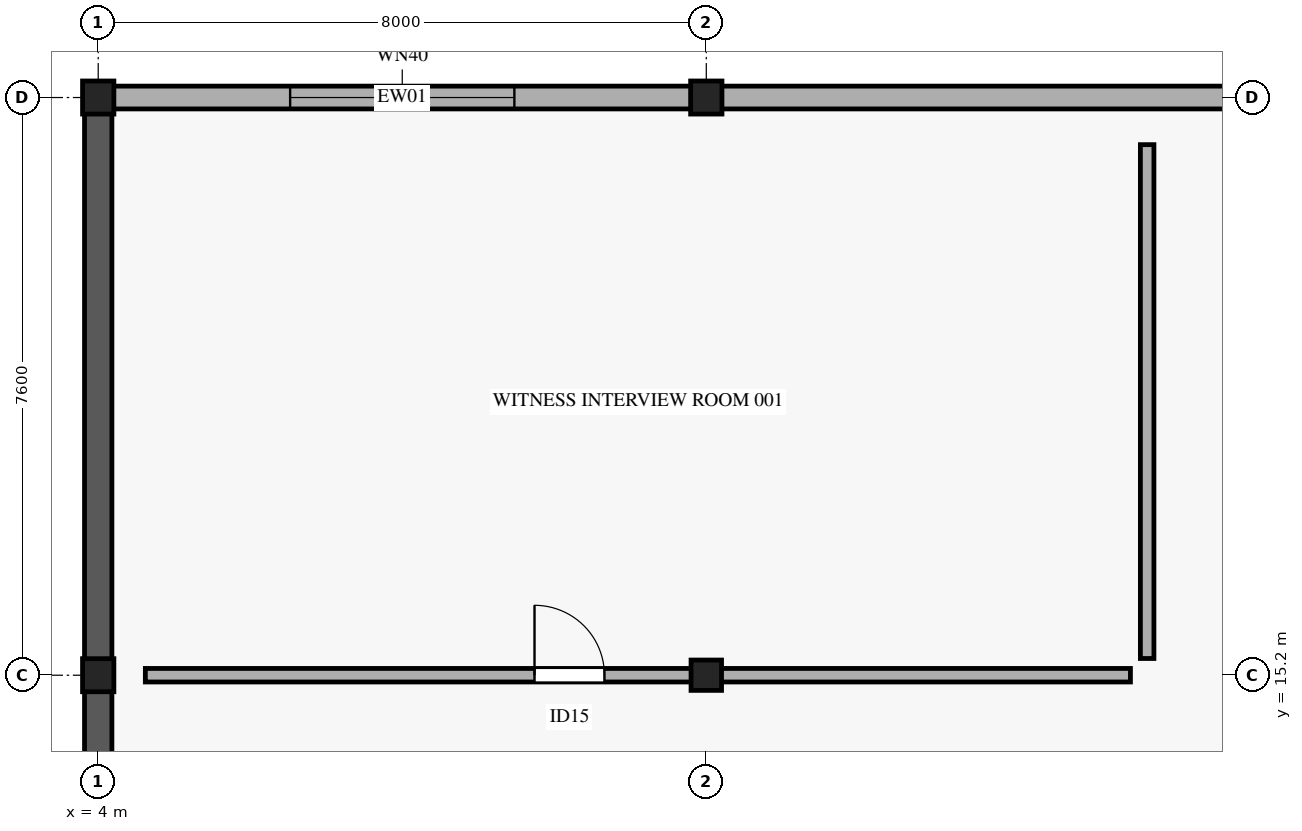
"""IFC4 building model, lengths in metres.
Left out: names, types, materials, properties, quantities, classifications, styles, units other than length and angle.
Written with IfcOpenShell. Run it as: python <this file> out.ifc"""

import sys

from ifc_helpers import new_model, si_unit, direction, frame, frame_2d, origin, origin_2d, place, context, subcontext, project, spatial, rectangle, i_section, extrude, element, fill, save


model = new_model("IFC4")
c1 = context("Model", 3, precision=1e-05, world=origin(), true_north=direction((0.0, 1.0)))
c2 = subcontext(c1, "Body", "Model", "MODEL_VIEW")
j1 = project(units=[si_unit("LENGTHUNIT", "METRE"), si_unit("PLANEANGLEUNIT", "RADIAN")], contexts=[c1])
p1 = place(None, origin())
s1 = spatial("IfcSite", under=j1, at=p1, CompositionType="ELEMENT")
p2 = place(p1, origin())
s2 = spatial("IfcBuilding", under=s1, at=p2, CompositionType="ELEMENT")
p3 = place(p2, origin())
s3 = spatial("IfcBuildingStorey", under=s2, at=p3, CompositionType="ELEMENT", Elevation=0.0)
for number, where, z_axis, x_axis in (
    (1, (4.0, 15.2, 0.0), (0.0, 0.0, 1.0), (1.0, 0.0, 0.0)),
    (2, (4.0, 22.8, 0.0), (0.0, 0.0, 1.0), (1.0, 0.0, 0.0)),
):
    element("IfcColumn", number, at=place(p3, frame(where, z_axis=z_axis, x_axis=x_axis)), inside=s3, PredefinedType="COLUMN", context=c2, shape_type="SweptSolid", body=[
        extrude(i_section(OverallWidth=0.412, OverallDepth=0.435, WebThickness=0.036, FlangeThickness=0.057, FilletRadius=0.015, at=origin_2d()), origin(), (0.0, 0.0, 1.0), 5.185),
    ])
p4 = place(p3, frame((12.0, 15.2, 0.0), z_axis=(0.0, 0.0, 1.0), x_axis=(1.0, 0.0, 0.0)))
e3 = element("IfcColumn", 3, at=p4, inside=s3, PredefinedType="COLUMN", context=c2, shape_type="SweptSolid", body=[
    extrude(i_section(OverallWidth=0.401, OverallDepth=0.399, WebThickness=0.025, FlangeThickness=0.04, FilletRadius=0.015, at=origin_2d()), origin(), (0.0, 0.0, 1.0), 5.185),
])
p5 = place(p3, frame((12.0, 22.8, 0.0), z_axis=(0.0, 0.0, 1.0), x_axis=(1.0, 0.0, 0.0)))
e4 = element("IfcColumn", 4, at=p5, inside=s3, PredefinedType="COLUMN", context=c2, shape_type="SweptSolid", body=[
    extrude(i_section(OverallWidth=0.412, OverallDepth=0.435, WebThickness=0.036, FlangeThickness=0.057, FilletRadius=0.015, at=origin_2d()), origin(), (0.0, 0.0, 1.0), 5.185),
])
p6 = place(p3, frame((4.0, 7.58, 0.0), z_axis=(0.0, 0.0, 1.0), x_axis=(0.0, 1.0, 0.0)))
e5 = element("IfcWall", 5, at=p6, inside=s3, PredefinedType="STANDARD", context=c2, shape_type="SweptSolid", body=[
    extrude(rectangle(XDim=7.64, YDim=0.36, at=frame_2d((3.82, 0.0))), origin(), (0.0, 0.0, 1.0), 5.19),
])
p7 = place(p3, frame((4.0, 15.18, 0.0), z_axis=(0.0, 0.0, 1.0), x_axis=(0.0, 1.0, 0.0)))
e6 = element("IfcWall", 6, at=p7, inside=s3, PredefinedType="STANDARD", context=c2, shape_type="SweptSolid", body=[
    extrude(rectangle(XDim=7.64, YDim=0.36, at=frame_2d((3.82, 0.0))), origin(), (0.0, 0.0, 1.0), 5.19),
])
p8 = place(p3, frame((3.98, 22.8, 0.0), z_axis=(0.0, 0.0, 1.0), x_axis=(1.0, 0.0, 0.0)))
e7 = element("IfcWall", 7, at=p8, inside=s3, PredefinedType="STANDARD", context=c2, shape_type="SweptSolid", body=[
    extrude(rectangle(XDim=8.04, YDim=0.3, at=frame_2d((4.02, 0.0))), origin(), (0.0, 0.0, 1.0), 4.25),
])
p9 = place(p8, frame((2.545, 0.0, 0.75)))
e8 = element("IfcOpeningElement", 8, at=p9, cuts=e7, PredefinedType="OPENING", context=c2, shape_type="SweptSolid", body=[
    extrude(rectangle(XDim=2.95, YDim=1.9, at=frame_2d((1.475, 0.95))), frame((0.0, 0.16, 0.0), z_axis=(0.0, -1.0, 0.0), x_axis=(1.0, 0.0, 0.0)), (0.0, 0.0, 1.0), 0.32),
])
p10 = place(p3, frame((11.98, 22.8, 0.0), z_axis=(0.0, 0.0, 1.0), x_axis=(1.0, 0.0, 0.0)))
e9 = element("IfcWall", 9, at=p10, inside=s3, PredefinedType="STANDARD", context=c2, shape_type="SweptSolid", body=[
    extrude(rectangle(XDim=8.04, YDim=0.3, at=frame_2d((4.02, 0.0))), origin(), (0.0, 0.0, 1.0), 4.25),
])
p11 = place(p3, frame((4.62, 15.2, 0.0), z_axis=(0.0, 0.0, 1.0), x_axis=(1.0, 0.0, 0.0)))
e10 = element("IfcWall", 10, at=p11, inside=s3, PredefinedType="PARTITIONING", context=c2, shape_type="SweptSolid", body=[
    extrude(rectangle(XDim=12.96, YDim=0.178, at=frame_2d((6.48, 0.0))), origin(), (0.0, 0.0, 1.0), 4.05),
])
p12 = place(p11, frame((5.12, 0.0, 0.0)))
e11 = element("IfcOpeningElement", 11, at=p12, cuts=e10, PredefinedType="OPENING", context=c2, shape_type="SweptSolid", body=[
    extrude(rectangle(XDim=0.92, YDim=2.2, at=frame_2d((0.46, 1.1))), frame((0.0, 0.099, 0.0), z_axis=(0.0, -1.0, 0.0), x_axis=(1.0, 0.0, 0.0)), (0.0, 0.0, 1.0), 0.198),
])
p13 = place(p3, frame((17.8, 15.42, 0.0), z_axis=(0.0, 0.0, 1.0), x_axis=(0.0, 1.0, 0.0)))
e12 = element("IfcWall", 12, at=p13, inside=s3, PredefinedType="PARTITIONING", context=c2, shape_type="SweptSolid", body=[
    extrude(rectangle(XDim=6.76, YDim=0.178, at=frame_2d((3.38, 0.0))), origin(), (0.0, 0.0, 1.0), 4.05),
])
p14 = place(p9, origin())
e13 = element("IfcWindow", 13, at=p14, inside=s3, PartitioningType="SINGLE_PANEL", PredefinedType="WINDOW", context=c2, shape_type="SweptSolid", body=[
    extrude(rectangle(XDim=2.95, YDim=1.9, at=frame_2d((1.475, 0.95))), frame((0.0, 0.03, 0.0), z_axis=(0.0, -1.0, 0.0), x_axis=(1.0, 0.0, 0.0)), (0.0, 0.0, 1.0), 0.06),
])
fill(e8, e13)
p15 = place(p12, origin())
e14 = element("IfcDoor", 14, at=p15, inside=s3, OperationType="SINGLE_SWING_LEFT", PredefinedType="DOOR", context=c2, shape_type="SweptSolid", body=[
    extrude(rectangle(XDim=0.92, YDim=2.2, at=frame_2d((0.46, 1.1))), frame((0.0, 0.025, 0.0), z_axis=(0.0, -1.0, 0.0), x_axis=(1.0, 0.0, 0.0)), (0.0, 0.0, 1.0), 0.05),
])
fill(e11, e14)
save(model, sys.argv[1])
